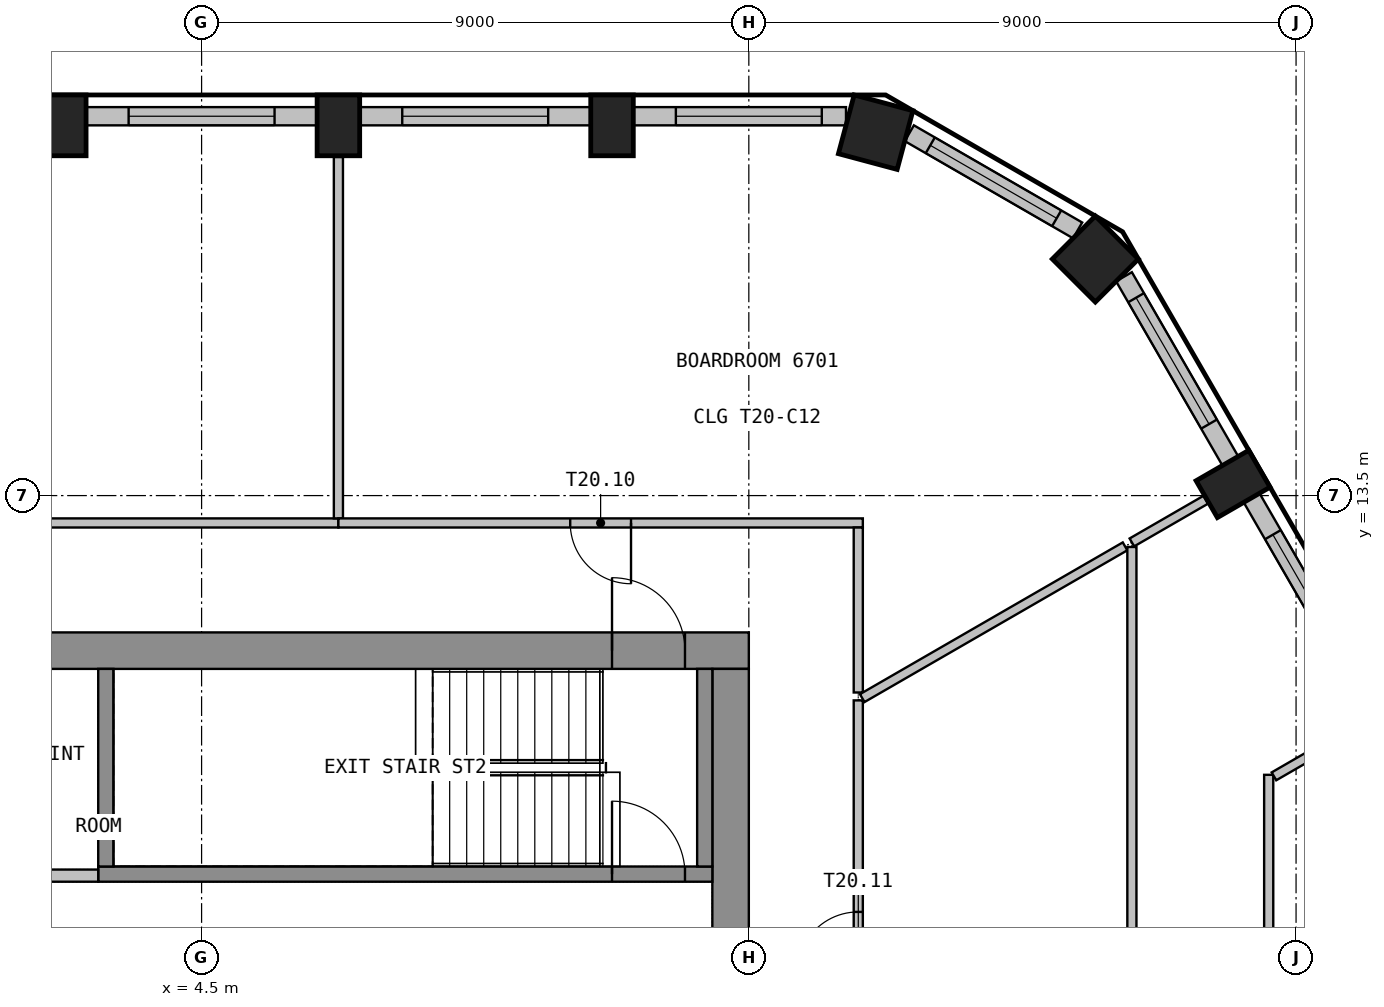
"""IFC4 building model, lengths in metres.
Left out: names, types, materials, properties, quantities, classifications, styles, units other than length and angle.
Written with IfcOpenShell. Run it as: python <this file> out.ifc"""

import sys

from ifc_helpers import new_model, si_unit, direction, frame, frame_2d, origin, origin_2d, place, context, subcontext, project, spatial, rectangle, extrude, element, fill, save


model = new_model("IFC4")
c1 = context("Model", 3, precision=1e-05, world=origin(), true_north=direction((0.0, 1.0)))
c2 = subcontext(c1, "Body", "Model", "MODEL_VIEW")
j1 = project(units=[si_unit("LENGTHUNIT", "METRE"), si_unit("PLANEANGLEUNIT", "RADIAN")], contexts=[c1])
p1 = place(None, origin())
s1 = spatial("IfcSite", under=j1, at=p1, CompositionType="ELEMENT")
p2 = place(p1, origin())
s2 = spatial("IfcBuilding", under=s1, at=p2, CompositionType="ELEMENT")
p3 = place(p2, frame((0.0, 0.0, 270.3)))
s3 = spatial("IfcBuildingStorey", under=s2, at=p3, CompositionType="ELEMENT", Elevation=270.3)
p4 = place(p3, frame((21.464, 13.691, 0.0), z_axis=(0.0, 0.0, 1.0), x_axis=(-0.5, 0.866025403784, 0.0)))
e1 = element("IfcColumn", 1, at=p4, inside=s3, PredefinedType="COLUMN", context=c2, shape_type="SweptSolid", body=[
    extrude(rectangle(XDim=0.7, YDim=1.0, at=origin_2d()), origin(), (0.0, 0.0, 1.0), 3.575),
])
for number, where, z_axis, x_axis in (
    (2, (19.199, 17.39, 0.0), (0.0, 0.0, 1.0), (-0.707, 0.707, 0.0)),
    (3, (15.586, 19.476, 0.0), (0.0, 0.0, 1.0), (-0.966, 0.259, 0.0)),
):
    element("IfcColumn", number, at=place(p3, frame(where, z_axis=z_axis, x_axis=x_axis)), inside=s3, PredefinedType="COLUMN", context=c2, shape_type="SweptSolid", body=[
        extrude(rectangle(XDim=1.0, YDim=1.0, at=origin_2d()), origin(), (0.0, 0.0, 1.0), 3.575),
    ])
for number, where, z_axis, x_axis in (
    (4, (11.25, 19.588, 0.0), (0.0, 0.0, 1.0), (-1.0, 0.0, 0.0)),
    (5, (6.75, 19.588, 0.0), (0.0, 0.0, 1.0), (-1.0, 0.0, 0.0)),
    (6, (2.25, 19.588, 0.0), (0.0, 0.0, 1.0), (-1.0, 0.0, 0.0)),
):
    element("IfcColumn", number, at=place(p3, frame(where, z_axis=z_axis, x_axis=x_axis)), inside=s3, PredefinedType="COLUMN", context=c2, shape_type="SweptSolid", body=[
        extrude(rectangle(XDim=0.7, YDim=1.0, at=origin_2d()), origin(), (0.0, 0.0, 1.0), 3.575),
    ])
p5 = place(p3, frame((23.669, 10.173, 0.0), z_axis=(0.0, 0.0, 1.0), x_axis=(-0.499982058975, 0.866035761792, 0.0)))
e7 = element("IfcWall", 7, at=p5, inside=s3, PredefinedType="SOLIDWALL", context=c2, shape_type="SweptSolid", body=[
    extrude(rectangle(XDim=3.799, YDim=0.3, at=frame_2d((1.899, 0.0))), origin(), (0.0, 0.0, 1.0), 3.575),
])
p6 = place(p5, frame((0.699, 0.0, 0.9)))
e8 = element("IfcOpeningElement", 8, at=p6, cuts=e7, PredefinedType="OPENING", context=c2, shape_type="SweptSolid", body=[
    extrude(rectangle(XDim=2.4, YDim=2.1, at=frame_2d((1.2, 1.05))), frame((0.0, 0.16, 0.0), z_axis=(0.0, -1.0, 0.0), x_axis=(1.0, 0.0, 0.0)), (0.0, 0.0, 1.0), 0.32),
])
p7 = place(p3, frame((21.419, 14.07, 0.0), z_axis=(0.0, 0.0, 1.0), x_axis=(-0.499960102815, 0.866048437209, 0.0)))
e9 = element("IfcWall", 9, at=p7, inside=s3, PredefinedType="SOLIDWALL", context=c2, shape_type="SweptSolid", body=[
    extrude(rectangle(XDim=3.498, YDim=0.3, at=frame_2d((1.749, 0.0))), origin(), (0.0, 0.0, 1.0), 3.575),
])
p8 = place(p7, frame((0.699, 0.0, 0.9)))
e10 = element("IfcOpeningElement", 10, at=p8, cuts=e9, PredefinedType="OPENING", context=c2, shape_type="SweptSolid", body=[
    extrude(rectangle(XDim=2.4, YDim=2.1, at=frame_2d((1.2, 1.05))), frame((0.0, 0.16, 0.0), z_axis=(0.0, -1.0, 0.0), x_axis=(1.0, 0.0, 0.0)), (0.0, 0.0, 1.0), 0.32),
])
p9 = place(p3, frame((18.908, 17.861, 0.0), z_axis=(0.0, 0.0, 1.0), x_axis=(-0.866025316205, 0.500000151692, 0.0)))
e11 = element("IfcWall", 11, at=p9, inside=s3, PredefinedType="SOLIDWALL", context=c2, shape_type="SweptSolid", body=[
    extrude(rectangle(XDim=3.196, YDim=0.3, at=frame_2d((1.598, 0.0))), origin(), (0.0, 0.0, 1.0), 3.575),
])
p10 = place(p9, frame((0.398, 0.0, 0.9)))
e12 = element("IfcOpeningElement", 12, at=p10, cuts=e11, PredefinedType="OPENING", context=c2, shape_type="SweptSolid", body=[
    extrude(rectangle(XDim=2.4, YDim=2.1, at=frame_2d((1.2, 1.05))), frame((0.0, 0.16, 0.0), z_axis=(0.0, -1.0, 0.0), x_axis=(1.0, 0.0, 0.0)), (0.0, 0.0, 1.0), 0.32),
])
p11 = place(p3, frame((15.098, 19.739, 0.0), z_axis=(0.0, 0.0, 1.0), x_axis=(-1.0, 0.0, 0.0)))
e13 = element("IfcWall", 13, at=p11, inside=s3, PredefinedType="SOLIDWALL", context=c2, shape_type="SweptSolid", body=[
    extrude(rectangle(XDim=3.498, YDim=0.3, at=frame_2d((1.749, 0.0))), origin(), (0.0, 0.0, 1.0), 3.575),
])
p12 = place(p11, frame((0.398, 0.0, 0.9)))
e14 = element("IfcOpeningElement", 14, at=p12, cuts=e13, PredefinedType="OPENING", context=c2, shape_type="SweptSolid", body=[
    extrude(rectangle(XDim=2.4, YDim=2.1, at=frame_2d((1.2, 1.05))), frame((0.0, 0.16, 0.0), z_axis=(0.0, -1.0, 0.0), x_axis=(1.0, 0.0, 0.0)), (0.0, 0.0, 1.0), 0.32),
])
p13 = place(p3, frame((10.899, 19.739, 0.0), z_axis=(0.0, 0.0, 1.0), x_axis=(-1.0, 0.0, 0.0)))
e15 = element("IfcWall", 15, at=p13, inside=s3, PredefinedType="SOLIDWALL", context=c2, shape_type="SweptSolid", body=[
    extrude(rectangle(XDim=3.799, YDim=0.3, at=frame_2d((1.899, 0.0))), origin(), (0.0, 0.0, 1.0), 3.575),
])
p14 = place(p13, frame((0.699, 0.0, 0.9)))
e16 = element("IfcOpeningElement", 16, at=p14, cuts=e15, PredefinedType="OPENING", context=c2, shape_type="SweptSolid", body=[
    extrude(rectangle(XDim=2.4, YDim=2.1, at=frame_2d((1.2, 1.05))), frame((0.0, 0.16, 0.0), z_axis=(0.0, -1.0, 0.0), x_axis=(1.0, 0.0, 0.0)), (0.0, 0.0, 1.0), 0.32),
])
p15 = place(p3, frame((6.399, 19.739, 0.0), z_axis=(0.0, 0.0, 1.0), x_axis=(-1.0, 0.0, 0.0)))
e17 = element("IfcWall", 17, at=p15, inside=s3, PredefinedType="SOLIDWALL", context=c2, shape_type="SweptSolid", body=[
    extrude(rectangle(XDim=3.799, YDim=0.3, at=frame_2d((1.899, 0.0))), origin(), (0.0, 0.0, 1.0), 3.575),
])
p16 = place(p15, frame((0.699, 0.0, 0.9)))
e18 = element("IfcOpeningElement", 18, at=p16, cuts=e17, PredefinedType="OPENING", context=c2, shape_type="SweptSolid", body=[
    extrude(rectangle(XDim=2.4, YDim=2.1, at=frame_2d((1.2, 1.05))), frame((0.0, 0.16, 0.0), z_axis=(0.0, -1.0, 0.0), x_axis=(1.0, 0.0, 0.0)), (0.0, 0.0, 1.0), 0.32),
])
p17 = place(p3, frame((-13.5, 10.95, 0.0), z_axis=(0.0, 0.0, 1.0), x_axis=(1.0, 0.0, 0.0)))
e19 = element("IfcWall", 19, at=p17, inside=s3, PredefinedType="SHEAR", context=c2, shape_type="SweptSolid", body=[
    extrude(rectangle(XDim=27.0, YDim=0.6, at=frame_2d((13.5, 0.0))), origin(), (0.0, 0.0, 1.0), 3.575),
])
p18 = place(p17, frame((12.3, 0.0, 0.0)))
e20 = element("IfcOpeningElement", 20, at=p18, cuts=e19, PredefinedType="OPENING", context=c2, shape_type="SweptSolid", body=[
    extrude(rectangle(XDim=2.4, YDim=2.1, at=frame_2d((1.2, 1.05))), frame((0.0, 0.31, 0.0), z_axis=(0.0, -1.0, 0.0), x_axis=(1.0, 0.0, 0.0)), (0.0, 0.0, 1.0), 0.62),
])
p19 = place(p17, frame((1.05, 0.0, 0.0)))
e21 = element("IfcOpeningElement", 21, at=p19, cuts=e19, PredefinedType="OPENING", context=c2, shape_type="SweptSolid", body=[
    extrude(rectangle(XDim=1.2, YDim=2.1, at=frame_2d((0.6, 1.05))), frame((0.0, 0.31, 0.0), z_axis=(0.0, -1.0, 0.0), x_axis=(1.0, 0.0, 0.0)), (0.0, 0.0, 1.0), 0.62),
])
p20 = place(p17, frame((24.75, 0.0, 0.0)))
e22 = element("IfcOpeningElement", 22, at=p20, cuts=e19, PredefinedType="OPENING", context=c2, shape_type="SweptSolid", body=[
    extrude(rectangle(XDim=1.2, YDim=2.1, at=frame_2d((0.6, 1.05))), frame((0.0, 0.31, 0.0), z_axis=(0.0, -1.0, 0.0), x_axis=(1.0, 0.0, 0.0)), (0.0, 0.0, 1.0), 0.62),
])
p21 = place(p3, frame((13.2, -10.65, 0.0), z_axis=(0.0, 0.0, 1.0), x_axis=(0.0, 1.0, 0.0)))
e23 = element("IfcWall", 23, at=p21, inside=s3, PredefinedType="SHEAR", context=c2, shape_type="SweptSolid", body=[
    extrude(rectangle(XDim=21.3, YDim=0.6, at=frame_2d((10.65, 0.0))), origin(), (0.0, 0.0, 1.0), 3.575),
])
p22 = place(p21, frame((9.45, 0.0, 0.0)))
e24 = element("IfcOpeningElement", 24, at=p22, cuts=e23, PredefinedType="OPENING", context=c2, shape_type="SweptSolid", body=[
    extrude(rectangle(XDim=2.4, YDim=2.1, at=frame_2d((1.2, 1.05))), frame((0.0, 0.31, 0.0), z_axis=(0.0, -1.0, 0.0), x_axis=(1.0, 0.0, 0.0)), (0.0, 0.0, 1.0), 0.62),
])
p23 = place(p3, frame((2.8, 7.275, 0.0), z_axis=(0.0, 0.0, 1.0), x_axis=(1.0, 0.0, 0.0)))
e25 = element("IfcWall", 25, at=p23, inside=s3, PredefinedType="SHEAR", context=c2, shape_type="SweptSolid", body=[
    extrude(rectangle(XDim=10.1, YDim=0.25, at=frame_2d((5.05, 0.0))), origin(), (0.0, 0.0, 1.0), 3.575),
])
p24 = place(p23, frame((8.45, 0.0, 0.0)))
e26 = element("IfcOpeningElement", 26, at=p24, cuts=e25, PredefinedType="OPENING", context=c2, shape_type="SweptSolid", body=[
    extrude(rectangle(XDim=1.2, YDim=2.1, at=frame_2d((0.6, 1.05))), frame((0.0, 0.135, 0.0), z_axis=(0.0, -1.0, 0.0), x_axis=(1.0, 0.0, 0.0)), (0.0, 0.0, 1.0), 0.27),
])
for number, where, z_axis, x_axis in (
    (27, (2.925, 7.4, 0.0), (0.0, 0.0, 1.0), (0.0, 1.0, 0.0)),
    (28, (12.775, 7.4, 0.0), (0.0, 0.0, 1.0), (0.0, 1.0, 0.0)),
):
    element("IfcWall", number, at=place(p3, frame(where, z_axis=z_axis, x_axis=x_axis)), inside=s3, PredefinedType="SHEAR", context=c2, shape_type="SweptSolid", body=[
        extrude(rectangle(XDim=3.25, YDim=0.25, at=frame_2d((1.625, 0.0))), origin(), (0.0, 0.0, 1.0), 3.575),
    ])
p25 = place(p3, frame((1.4, 7.25, 0.0), z_axis=(0.0, 0.0, 1.0), x_axis=(1.0, 0.0, 0.0)))
e29 = element("IfcWall", 29, at=p25, inside=s3, PredefinedType="PARTITIONING", context=c2, shape_type="SweptSolid", body=[
    extrude(rectangle(XDim=1.4, YDim=0.2, at=frame_2d((0.7, 0.0))), origin(), (0.0, 0.0, 1.0), 3.575),
])
p26 = place(p3, frame((6.75, 13.05, 0.0), z_axis=(0.0, 0.0, 1.0), x_axis=(-1.0, 0.0, 0.0)))
e30 = element("IfcWall", 30, at=p26, inside=s3, PredefinedType="PARTITIONING", context=c2, shape_type="SweptSolid", body=[
    extrude(rectangle(XDim=18.0, YDim=0.15, at=frame_2d((9.0, 0.0))), origin(), (0.0, 0.0, 1.0), 3.575),
])
p27 = place(p26, frame((8.5, 0.0, 0.0)))
e31 = element("IfcOpeningElement", 31, at=p27, cuts=e30, PredefinedType="OPENING", context=c2, shape_type="SweptSolid", body=[
    extrude(rectangle(XDim=1.0, YDim=2.1, at=frame_2d((0.5, 1.05))), frame((0.0, 0.085, 0.0), z_axis=(0.0, -1.0, 0.0), x_axis=(1.0, 0.0, 0.0)), (0.0, 0.0, 1.0), 0.17),
])
p28 = place(p3, frame((6.75, 19.069, 0.0), z_axis=(0.0, 0.0, 1.0), x_axis=(0.0, -1.0, 0.0)))
e32 = element("IfcWall", 32, at=p28, inside=s3, PredefinedType="PARTITIONING", context=c2, shape_type="SweptSolid", body=[
    extrude(rectangle(XDim=5.944, YDim=0.15, at=frame_2d((2.972, 0.0))), origin(), (0.0, 0.0, 1.0), 3.575),
])
p29 = place(p3, frame((15.375, 13.05, 0.0), z_axis=(0.0, 0.0, 1.0), x_axis=(-1.0, 0.0, 0.0)))
e33 = element("IfcWall", 33, at=p29, inside=s3, PredefinedType="PARTITIONING", context=c2, shape_type="SweptSolid", body=[
    extrude(rectangle(XDim=8.625, YDim=0.15, at=frame_2d((4.312, 0.0))), origin(), (0.0, 0.0, 1.0), 3.575),
])
p30 = place(p29, frame((3.812, 0.0, 0.0)))
e34 = element("IfcOpeningElement", 34, at=p30, cuts=e33, PredefinedType="OPENING", context=c2, shape_type="SweptSolid", body=[
    extrude(rectangle(XDim=1.0, YDim=2.1, at=frame_2d((0.5, 1.05))), frame((0.0, 0.085, 0.0), z_axis=(0.0, -1.0, 0.0), x_axis=(1.0, 0.0, 0.0)), (0.0, 0.0, 1.0), 0.17),
])
p31 = place(p3, frame((15.3, 2.175, 0.0), z_axis=(0.0, 0.0, 1.0), x_axis=(0.0, 1.0, 0.0)))
e35 = element("IfcWall", 35, at=p31, inside=s3, PredefinedType="PARTITIONING", context=c2, shape_type="SweptSolid", body=[
    extrude(rectangle(XDim=7.957, YDim=0.15, at=frame_2d((3.979, 0.0))), origin(), (0.0, 0.0, 1.0), 3.575),
])
p32 = place(p31, frame((3.479, 0.0, 0.0)))
e36 = element("IfcOpeningElement", 36, at=p32, cuts=e35, PredefinedType="OPENING", context=c2, shape_type="SweptSolid", body=[
    extrude(rectangle(XDim=1.0, YDim=2.1, at=frame_2d((0.5, 1.05))), frame((0.0, 0.085, 0.0), z_axis=(0.0, -1.0, 0.0), x_axis=(1.0, 0.0, 0.0)), (0.0, 0.0, 1.0), 0.17),
])
p33 = place(p3, frame((15.3, 10.262, 0.0), z_axis=(0.0, 0.0, 1.0), x_axis=(0.0, 1.0, 0.0)))
e37 = element("IfcWall", 37, at=p33, inside=s3, PredefinedType="PARTITIONING", context=c2, shape_type="SweptSolid", body=[
    extrude(rectangle(XDim=2.713, YDim=0.15, at=frame_2d((1.356, 0.0))), origin(), (0.0, 0.0, 1.0), 3.575),
])
p34 = place(p3, frame((19.688, 12.665, 0.0), z_axis=(0.0, 0.0, 1.0), x_axis=(-0.866025118187, -0.500000494669, 0.0)))
e38 = element("IfcWall", 38, at=p34, inside=s3, PredefinedType="PARTITIONING", context=c2, shape_type="SweptSolid", body=[
    extrude(rectangle(XDim=4.991, YDim=0.15, at=frame_2d((2.496, 0.0))), origin(), (0.0, 0.0, 1.0), 3.575),
])
p35 = place(p3, frame((19.8, 12.655, 0.0), z_axis=(0.0, 0.0, 1.0), x_axis=(0.0, -1.0, 0.0)))
e39 = element("IfcWall", 39, at=p35, inside=s3, PredefinedType="PARTITIONING", context=c2, shape_type="SweptSolid", body=[
    extrude(rectangle(XDim=10.33, YDim=0.15, at=frame_2d((5.165, 0.0))), origin(), (0.0, 0.0, 1.0), 3.575),
])
p36 = place(p3, frame((21.014, 13.431, 0.0), z_axis=(0.0, 0.0, 1.0), x_axis=(-0.865918715181, -0.500184744569, 0.0)))
e40 = element("IfcWall", 40, at=p36, inside=s3, PredefinedType="PARTITIONING", context=c2, shape_type="SweptSolid", body=[
    extrude(rectangle(XDim=1.402, YDim=0.15, at=frame_2d((0.701, 0.0))), origin(), (0.0, 0.0, 1.0), 3.575),
])
p37 = place(p3, frame((22.05, 8.908, 0.0), z_axis=(0.0, 0.0, 1.0), x_axis=(0.0, -1.0, 0.0)))
e41 = element("IfcWall", 41, at=p37, inside=s3, PredefinedType="PARTITIONING", context=c2, shape_type="SweptSolid", body=[
    extrude(rectangle(XDim=6.583, YDim=0.15, at=frame_2d((3.292, 0.0))), origin(), (0.0, 0.0, 1.0), 3.575),
])
p38 = place(p3, frame((23.264, 9.534, 0.0), z_axis=(0.0, 0.0, 1.0), x_axis=(-0.865960725898, -0.500112008656, 0.0)))
e42 = element("IfcWall", 42, at=p38, inside=s3, PredefinedType="PARTITIONING", context=c2, shape_type="SweptSolid", body=[
    extrude(rectangle(XDim=1.302, YDim=0.15, at=frame_2d((0.651, 0.0))), origin(), (0.0, 0.0, 1.0), 3.575),
])
p39 = place(p6, origin())
e43 = element("IfcWindow", 43, at=p39, inside=s3, PartitioningType="SINGLE_PANEL", PredefinedType="WINDOW", context=c2, shape_type="SweptSolid", body=[
    extrude(rectangle(XDim=2.4, YDim=2.1, at=frame_2d((1.2, 1.05))), frame((0.0, 0.03, 0.0), z_axis=(0.0, -1.0, 0.0), x_axis=(1.0, 0.0, 0.0)), (0.0, 0.0, 1.0), 0.06),
])
fill(e8, e43)
p40 = place(p8, origin())
e44 = element("IfcWindow", 44, at=p40, inside=s3, PartitioningType="SINGLE_PANEL", PredefinedType="WINDOW", context=c2, shape_type="SweptSolid", body=[
    extrude(rectangle(XDim=2.4, YDim=2.1, at=frame_2d((1.2, 1.05))), frame((0.0, 0.03, 0.0), z_axis=(0.0, -1.0, 0.0), x_axis=(1.0, 0.0, 0.0)), (0.0, 0.0, 1.0), 0.06),
])
fill(e10, e44)
p41 = place(p10, origin())
e45 = element("IfcWindow", 45, at=p41, inside=s3, PartitioningType="SINGLE_PANEL", PredefinedType="WINDOW", context=c2, shape_type="SweptSolid", body=[
    extrude(rectangle(XDim=2.4, YDim=2.1, at=frame_2d((1.2, 1.05))), frame((0.0, 0.03, 0.0), z_axis=(0.0, -1.0, 0.0), x_axis=(1.0, 0.0, 0.0)), (0.0, 0.0, 1.0), 0.06),
])
fill(e12, e45)
p42 = place(p12, origin())
e46 = element("IfcWindow", 46, at=p42, inside=s3, PartitioningType="SINGLE_PANEL", PredefinedType="WINDOW", context=c2, shape_type="SweptSolid", body=[
    extrude(rectangle(XDim=2.4, YDim=2.1, at=frame_2d((1.2, 1.05))), frame((0.0, 0.03, 0.0), z_axis=(0.0, -1.0, 0.0), x_axis=(1.0, 0.0, 0.0)), (0.0, 0.0, 1.0), 0.06),
])
fill(e14, e46)
p43 = place(p14, origin())
e47 = element("IfcWindow", 47, at=p43, inside=s3, PartitioningType="SINGLE_PANEL", PredefinedType="WINDOW", context=c2, shape_type="SweptSolid", body=[
    extrude(rectangle(XDim=2.4, YDim=2.1, at=frame_2d((1.2, 1.05))), frame((0.0, 0.03, 0.0), z_axis=(0.0, -1.0, 0.0), x_axis=(1.0, 0.0, 0.0)), (0.0, 0.0, 1.0), 0.06),
])
fill(e16, e47)
p44 = place(p16, origin())
e48 = element("IfcWindow", 48, at=p44, inside=s3, PartitioningType="SINGLE_PANEL", PredefinedType="WINDOW", context=c2, shape_type="SweptSolid", body=[
    extrude(rectangle(XDim=2.4, YDim=2.1, at=frame_2d((1.2, 1.05))), frame((0.0, 0.03, 0.0), z_axis=(0.0, -1.0, 0.0), x_axis=(1.0, 0.0, 0.0)), (0.0, 0.0, 1.0), 0.06),
])
fill(e18, e48)
p45 = place(p20, origin())
e49 = element("IfcDoor", 49, at=p45, inside=s3, OperationType="SINGLE_SWING_RIGHT", PredefinedType="DOOR", context=c2, shape_type="SweptSolid", body=[
    extrude(rectangle(XDim=1.2, YDim=2.1, at=frame_2d((0.6, 1.05))), frame((0.0, 0.025, 0.0), z_axis=(0.0, -1.0, 0.0), x_axis=(1.0, 0.0, 0.0)), (0.0, 0.0, 1.0), 0.05),
])
fill(e22, e49)
p46 = place(p24, origin())
e50 = element("IfcDoor", 50, at=p46, inside=s3, OperationType="SINGLE_SWING_LEFT", PredefinedType="DOOR", context=c2, shape_type="SweptSolid", body=[
    extrude(rectangle(XDim=1.2, YDim=2.1, at=frame_2d((0.6, 1.05))), frame((0.0, 0.025, 0.0), z_axis=(0.0, -1.0, 0.0), x_axis=(1.0, 0.0, 0.0)), (0.0, 0.0, 1.0), 0.05),
])
fill(e26, e50)
p47 = place(p30, origin())
e51 = element("IfcDoor", 51, at=p47, inside=s3, OperationType="SINGLE_SWING_RIGHT", PredefinedType="DOOR", context=c2, shape_type="SweptSolid", body=[
    extrude(rectangle(XDim=1.0, YDim=2.1, at=frame_2d((0.5, 1.05))), frame((0.0, 0.025, 0.0), z_axis=(0.0, -1.0, 0.0), x_axis=(1.0, 0.0, 0.0)), (0.0, 0.0, 1.0), 0.05),
])
fill(e34, e51)
p48 = place(p32, origin())
e52 = element("IfcDoor", 52, at=p48, inside=s3, OperationType="SINGLE_SWING_RIGHT", PredefinedType="DOOR", context=c2, shape_type="SweptSolid", body=[
    extrude(rectangle(XDim=1.0, YDim=2.1, at=frame_2d((0.5, 1.05))), frame((0.0, 0.025, 0.0), z_axis=(0.0, -1.0, 0.0), x_axis=(1.0, 0.0, 0.0)), (0.0, 0.0, 1.0), 0.05),
])
fill(e36, e52)
save(model, sys.argv[1])
